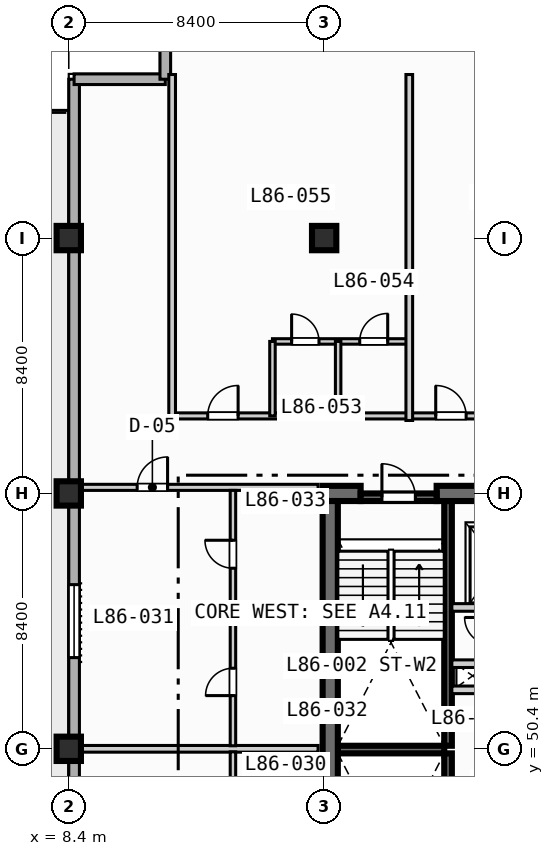
"""IFC4 building model, lengths in metres.
Left out: names, types, materials, properties, quantities, classifications, styles, units other than length and angle.
Written with IfcOpenShell. Run it as: python <this file> out.ifc"""

import sys

from ifc_helpers import new_model, si_unit, direction, frame, frame_2d, origin, origin_2d, place, context, subcontext, project, spatial, rectangle, extrude, element, fill, save


model = new_model("IFC4")
c1 = context("Model", 3, precision=1e-05, world=origin(), true_north=direction((0.0, 1.0)))
c2 = subcontext(c1, "Body", "Model", "MODEL_VIEW")
j1 = project(units=[si_unit("LENGTHUNIT", "METRE"), si_unit("PLANEANGLEUNIT", "RADIAN")], contexts=[c1])
p1 = place(None, origin())
s1 = spatial("IfcSite", under=j1, at=p1, CompositionType="ELEMENT")
p2 = place(p1, origin())
s2 = spatial("IfcBuilding", under=s1, at=p2, CompositionType="ELEMENT")
p3 = place(p2, frame((0.0, 0.0, 347.6)))
s3 = spatial("IfcBuildingStorey", under=s2, at=p3, CompositionType="ELEMENT", Elevation=347.6)
for number, where, z_axis, x_axis in (
    (1, (20.875, 42.2, 0.0), (0.0, 0.0, 1.0), (0.0, 1.0, 0.0)),
    (2, (20.875, 50.5, 0.0), (0.0, 0.0, 1.0), (0.0, 1.0, 0.0)),
):
    element("IfcWall", number, at=place(p3, frame(where, z_axis=z_axis, x_axis=x_axis)), inside=s3, PredefinedType="SOLIDWALL", context=c2, shape_type="SweptSolid", body=[
        extrude(rectangle(XDim=8.05, YDim=0.25, at=frame_2d((4.025, 0.0))), origin(), (0.0, 0.0, 1.0), 3.67),
    ])
p4 = place(p3, frame((17.25, 50.375, 0.0), z_axis=(0.0, 0.0, 1.0), x_axis=(1.0, 0.0, 0.0)))
e3 = element("IfcWall", 3, at=p4, inside=s3, PredefinedType="SOLIDWALL", context=c2, shape_type="SweptSolid", body=[
    extrude(rectangle(XDim=3.5, YDim=0.25, at=frame_2d((1.75, 0.0))), origin(), (0.0, 0.0, 1.0), 3.67),
])
p5 = place(p3, frame((16.75, 58.8, 0.0), z_axis=(0.0, 0.0, 1.0), x_axis=(1.0, 0.0, 0.0)))
e4 = element("IfcWall", 4, at=p5, inside=s3, PredefinedType="SHEAR", context=c2, shape_type="SweptSolid", body=[
    extrude(rectangle(XDim=1.25, YDim=0.5, at=frame_2d((0.625, 0.0))), origin(), (0.0, 0.0, 1.0), 3.67),
])
p6 = place(p3, frame((20.5, 58.8, 0.0), z_axis=(0.0, 0.0, 1.0), x_axis=(1.0, 0.0, 0.0)))
e5 = element("IfcWall", 5, at=p6, inside=s3, PredefinedType="SHEAR", context=c2, shape_type="SweptSolid", body=[
    extrude(rectangle(XDim=4.95, YDim=0.5, at=frame_2d((2.475, 0.0))), origin(), (0.0, 0.0, 1.0), 3.67),
])
p7 = place(p3, frame((17.0, 42.2, 0.0), z_axis=(0.0, 0.0, 1.0), x_axis=(0.0, 1.0, 0.0)))
e6 = element("IfcWall", 6, at=p7, inside=s3, PredefinedType="SHEAR", context=c2, shape_type="SweptSolid", body=[
    extrude(rectangle(XDim=16.35, YDim=0.5, at=frame_2d((8.175, 0.0))), origin(), (0.0, 0.0, 1.0), 3.67),
])
for number, where, z_axis, x_axis in (
    (7, (8.4, 50.4, 0.0), (0.0, 0.0, 1.0), (1.0, 0.0, 0.0)),
    (8, (8.4, 58.8, 0.0), (0.0, 0.0, 1.0), (1.0, 0.0, 0.0)),
    (9, (8.4, 67.2, 0.0), (0.0, 0.0, 1.0), (1.0, 0.0, 0.0)),
    (10, (16.8, 67.2, 0.0), (0.0, 0.0, 1.0), (1.0, 0.0, 0.0)),
):
    element("IfcColumn", number, at=place(p3, frame(where, z_axis=z_axis, x_axis=x_axis)), inside=s3, PredefinedType="COLUMN", context=c2, shape_type="SweptSolid", body=[
        extrude(rectangle(XDim=0.8, YDim=0.8, at=origin_2d()), origin(), (0.0, 0.0, 1.0), 3.9),
    ])
p8 = place(p3, frame((8.575, 11.575, 0.0), z_axis=(0.0, 0.0, 1.0), x_axis=(0.0, 1.0, 0.0)))
e11 = element("IfcWall", 11, at=p8, inside=s3, PredefinedType="STANDARD", context=c2, shape_type="SweptSolid", body=[
    extrude(rectangle(XDim=60.85, YDim=0.35, at=frame_2d((30.425, 0.0))), origin(), (0.0, 0.0, 1.0), 3.67),
])
p9 = place(p8, frame((33.925, 0.0, 0.0)))
e12 = element("IfcOpeningElement", 12, at=p9, cuts=e11, PredefinedType="OPENING", context=c2, shape_type="SweptSolid", body=[
    extrude(rectangle(XDim=1.4, YDim=2.2, at=frame_2d((0.7, 1.1))), frame((0.0, 0.185, 0.0), z_axis=(0.0, -1.0, 0.0), x_axis=(1.0, 0.0, 0.0)), (0.0, 0.0, 1.0), 0.37),
])
p10 = place(p8, frame((16.925, 0.0, 0.85)))
e13 = element("IfcOpeningElement", 13, at=p10, cuts=e11, PredefinedType="OPENING", context=c2, shape_type="SweptSolid", body=[
    extrude(rectangle(XDim=1.8, YDim=1.8, at=frame_2d((0.9, 0.9))), frame((0.0, 0.185, 0.0), z_axis=(0.0, -1.0, 0.0), x_axis=(1.0, 0.0, 0.0)), (0.0, 0.0, 1.0), 0.37),
])
p11 = place(p8, frame((25.025, 0.0, 0.85)))
e14 = element("IfcOpeningElement", 14, at=p11, cuts=e11, PredefinedType="OPENING", context=c2, shape_type="SweptSolid", body=[
    extrude(rectangle(XDim=2.4, YDim=1.95, at=frame_2d((1.2, 0.975))), frame((0.0, 0.185, 0.0), z_axis=(0.0, -1.0, 0.0), x_axis=(1.0, 0.0, 0.0)), (0.0, 0.0, 1.0), 0.37),
])
p12 = place(p8, frame((41.825, 0.0, 0.85)))
e15 = element("IfcOpeningElement", 15, at=p12, cuts=e11, PredefinedType="OPENING", context=c2, shape_type="SweptSolid", body=[
    extrude(rectangle(XDim=2.4, YDim=1.95, at=frame_2d((1.2, 0.975))), frame((0.0, 0.185, 0.0), z_axis=(0.0, -1.0, 0.0), x_axis=(1.0, 0.0, 0.0)), (0.0, 0.0, 1.0), 0.37),
])
for number, where, z_axis, x_axis in (
    (16, (8.575, 72.425, 0.0), (0.0, 0.0, 1.0), (1.0, 0.0, 0.0)),
    (17, (11.575, 72.425, 0.0), (0.0, 0.0, 1.0), (0.0, 1.0, 0.0)),
):
    element("IfcWall", number, at=place(p3, frame(where, z_axis=z_axis, x_axis=x_axis)), inside=s3, PredefinedType="STANDARD", context=c2, shape_type="SweptSolid", body=[
        extrude(rectangle(XDim=3.0, YDim=0.35, at=frame_2d((1.5, 0.0))), origin(), (0.0, 0.0, 1.0), 3.67),
    ])
p13 = place(p3, frame((18.0, 58.675, 0.0), z_axis=(0.0, 0.0, 1.0), x_axis=(1.0, 0.0, 0.0)))
e18 = element("IfcWall", 18, at=p13, inside=s3, PredefinedType="SOLIDWALL", context=c2, shape_type="SweptSolid", body=[
    extrude(rectangle(XDim=2.5, YDim=0.25, at=frame_2d((1.25, 0.0))), origin(), (0.0, 0.0, 1.0), 3.67),
])
p14 = place(p13, frame((0.7, 0.0, 0.0)))
e19 = element("IfcOpeningElement", 19, at=p14, cuts=e18, PredefinedType="OPENING", context=c2, shape_type="SweptSolid", body=[
    extrude(rectangle(XDim=1.1, YDim=2.15, at=frame_2d((0.55, 1.075))), frame((0.0, 0.135, 0.0), z_axis=(0.0, -1.0, 0.0), x_axis=(1.0, 0.0, 0.0)), (0.0, 0.0, 1.0), 0.27),
])
p15 = place(p3, frame((21.0, 52.34, 0.0), z_axis=(0.0, 0.0, 1.0), x_axis=(1.0, 0.0, 0.0)))
e20 = element("IfcWall", 20, at=p15, inside=s3, PredefinedType="SOLIDWALL", context=c2, shape_type="SweptSolid", body=[
    extrude(rectangle(XDim=3.95, YDim=0.25, at=frame_2d((1.975, 0.0))), origin(), (0.0, 0.0, 1.0), 3.67),
])
p16 = place(p3, frame((21.0, 55.05, 0.0), z_axis=(0.0, 0.0, 1.0), x_axis=(1.0, 0.0, 0.0)))
e21 = element("IfcWall", 21, at=p16, inside=s3, PredefinedType="SOLIDWALL", context=c2, shape_type="SweptSolid", body=[
    extrude(rectangle(XDim=4.15, YDim=0.25, at=frame_2d((2.075, 0.0))), origin(), (0.0, 0.0, 1.0), 3.67),
])
p17 = place(p16, frame((1.85, 0.0, 0.0)))
e22 = element("IfcOpeningElement", 22, at=p17, cuts=e21, PredefinedType="OPENING", context=c2, shape_type="SweptSolid", body=[
    extrude(rectangle(XDim=1.1, YDim=2.15, at=frame_2d((0.55, 1.075))), frame((0.0, 0.135, 0.0), z_axis=(0.0, -1.0, 0.0), x_axis=(1.0, 0.0, 0.0)), (0.0, 0.0, 1.0), 0.27),
])
p18 = place(p3, frame((21.0, 53.2, 0.0), z_axis=(0.0, 0.0, 1.0), x_axis=(1.0, 0.0, 0.0)))
e23 = element("IfcWall", 23, at=p18, inside=s3, PredefinedType="SOLIDWALL", context=c2, shape_type="SweptSolid", body=[
    extrude(rectangle(XDim=1.3, YDim=0.25, at=frame_2d((0.65, 0.0))), origin(), (0.0, 0.0, 1.0), 3.67),
])
p19 = place(p3, frame((8.65, 59.0, 0.0), z_axis=(0.0, 0.0, 1.0), x_axis=(1.0, 0.0, 0.0)))
e24 = element("IfcWall", 24, at=p19, inside=s3, PredefinedType="PARTITIONING", context=c2, shape_type="SweptSolid", body=[
    extrude(rectangle(XDim=7.95, YDim=0.2, at=frame_2d((3.975, 0.0))), origin(), (0.0, 0.0, 1.0), 3.07),
])
p20 = place(p19, frame((2.0, 0.0, 0.0)))
e25 = element("IfcOpeningElement", 25, at=p20, cuts=e24, PredefinedType="OPENING", context=c2, shape_type="SweptSolid", body=[
    extrude(rectangle(XDim=1.0, YDim=2.15, at=frame_2d((0.5, 1.075))), frame((0.0, 0.11, 0.0), z_axis=(0.0, -1.0, 0.0), x_axis=(1.0, 0.0, 0.0)), (0.0, 0.0, 1.0), 0.22),
])
p21 = place(p3, frame((8.65, 50.4, 0.0), z_axis=(0.0, 0.0, 1.0), x_axis=(1.0, 0.0, 0.0)))
e26 = element("IfcWall", 26, at=p21, inside=s3, PredefinedType="PARTITIONING", context=c2, shape_type="SweptSolid", body=[
    extrude(rectangle(XDim=7.95, YDim=0.22, at=frame_2d((3.975, 0.0))), origin(), (0.0, 0.0, 1.0), 3.059),
])
p22 = place(p3, frame((13.8, 41.7, 0.0), z_axis=(0.0, 0.0, 1.0), x_axis=(0.0, 1.0, 0.0)))
e27 = element("IfcWall", 27, at=p22, inside=s3, PredefinedType="PLUMBINGWALL", context=c2, shape_type="SweptSolid", body=[
    extrude(rectangle(XDim=8.6, YDim=0.18, at=frame_2d((4.3, 0.0))), origin(), (0.0, 0.0, 1.0), 3.67),
])
p23 = place(p22, frame((1.7, 0.0, 0.0)))
e28 = element("IfcOpeningElement", 28, at=p23, cuts=e27, PredefinedType="OPENING", context=c2, shape_type="SweptSolid", body=[
    extrude(rectangle(XDim=0.9, YDim=2.1, at=frame_2d((0.45, 1.05))), frame((0.0, 0.1, 0.0), z_axis=(0.0, -1.0, 0.0), x_axis=(1.0, 0.0, 0.0)), (0.0, 0.0, 1.0), 0.2),
])
p24 = place(p22, frame((5.99, 0.0, 0.0)))
e29 = element("IfcOpeningElement", 29, at=p24, cuts=e27, PredefinedType="OPENING", context=c2, shape_type="SweptSolid", body=[
    extrude(rectangle(XDim=0.92, YDim=2.1, at=frame_2d((0.46, 1.05))), frame((0.0, 0.1, 0.0), z_axis=(0.0, -1.0, 0.0), x_axis=(1.0, 0.0, 0.0)), (0.0, 0.0, 1.0), 0.2),
])
p25 = place(p3, frame((13.8, 50.5, 0.0), z_axis=(0.0, 0.0, 1.0), x_axis=(0.0, 1.0, 0.0)))
e30 = element("IfcWall", 30, at=p25, inside=s3, PredefinedType="PLUMBINGWALL", context=c2, shape_type="SweptSolid", body=[
    extrude(rectangle(XDim=8.4, YDim=0.18, at=frame_2d((4.2, 0.0))), origin(), (0.0, 0.0, 1.0), 3.67),
])
p26 = place(p25, frame((1.65, 0.0, 0.0)))
e31 = element("IfcOpeningElement", 31, at=p26, cuts=e30, PredefinedType="OPENING", context=c2, shape_type="SweptSolid", body=[
    extrude(rectangle(XDim=0.9, YDim=2.1, at=frame_2d((0.45, 1.05))), frame((0.0, 0.1, 0.0), z_axis=(0.0, -1.0, 0.0), x_axis=(1.0, 0.0, 0.0)), (0.0, 0.0, 1.0), 0.2),
])
p27 = place(p25, frame((5.84, 0.0, 0.0)))
e32 = element("IfcOpeningElement", 32, at=p27, cuts=e30, PredefinedType="OPENING", context=c2, shape_type="SweptSolid", body=[
    extrude(rectangle(XDim=0.92, YDim=2.1, at=frame_2d((0.46, 1.05))), frame((0.0, 0.1, 0.0), z_axis=(0.0, -1.0, 0.0), x_axis=(1.0, 0.0, 0.0)), (0.0, 0.0, 1.0), 0.2),
])
p28 = place(p3, frame((13.8, 54.7, 0.0), z_axis=(0.0, 0.0, 1.0), x_axis=(1.0, 0.0, 0.0)))
e33 = element("IfcWall", 33, at=p28, inside=s3, PredefinedType="PLUMBINGWALL", context=c2, shape_type="SweptSolid", body=[
    extrude(rectangle(XDim=2.8, YDim=0.18, at=frame_2d((1.4, 0.0))), origin(), (0.0, 0.0, 1.0), 3.67),
])
p29 = place(p3, frame((11.8, 61.35, 0.0), z_axis=(0.0, 0.0, 1.0), x_axis=(1.0, 0.0, 0.0)))
e34 = element("IfcWall", 34, at=p29, inside=s3, PredefinedType="PARTITIONING", context=c2, shape_type="SweptSolid", body=[
    extrude(rectangle(XDim=21.35, YDim=0.2, at=frame_2d((10.675, 0.0))), origin(), (0.0, 0.0, 1.0), 3.67),
])
p30 = place(p29, frame((1.17, 0.0, 0.0)))
e35 = element("IfcOpeningElement", 35, at=p30, cuts=e34, PredefinedType="OPENING", context=c2, shape_type="SweptSolid", body=[
    extrude(rectangle(XDim=1.0, YDim=2.15, at=frame_2d((0.5, 1.075))), frame((0.0, 0.11, 0.0), z_axis=(0.0, -1.0, 0.0), x_axis=(1.0, 0.0, 0.0)), (0.0, 0.0, 1.0), 0.22),
])
p31 = place(p29, frame((8.67, 0.0, 0.0)))
e36 = element("IfcOpeningElement", 36, at=p31, cuts=e34, PredefinedType="OPENING", context=c2, shape_type="SweptSolid", body=[
    extrude(rectangle(XDim=1.0, YDim=2.15, at=frame_2d((0.5, 1.075))), frame((0.0, 0.11, 0.0), z_axis=(0.0, -1.0, 0.0), x_axis=(1.0, 0.0, 0.0)), (0.0, 0.0, 1.0), 0.22),
])
p32 = place(p29, frame((15.445, 0.0, 0.0)))
e37 = element("IfcOpeningElement", 37, at=p32, cuts=e34, PredefinedType="OPENING", context=c2, shape_type="SweptSolid", body=[
    extrude(rectangle(XDim=1.0, YDim=2.15, at=frame_2d((0.5, 1.075))), frame((0.0, 0.11, 0.0), z_axis=(0.0, -1.0, 0.0), x_axis=(1.0, 0.0, 0.0)), (0.0, 0.0, 1.0), 0.22),
])
p33 = place(p3, frame((11.8, 61.2, 0.0), z_axis=(0.0, 0.0, 1.0), x_axis=(0.0, 1.0, 0.0)))
e38 = element("IfcWall", 38, at=p33, inside=s3, PredefinedType="PARTITIONING", context=c2, shape_type="SweptSolid", body=[
    extrude(rectangle(XDim=11.38, YDim=0.22, at=frame_2d((5.69, 0.0))), origin(), (0.0, 0.0, 1.0), 3.67),
])
p34 = place(p3, frame((15.1, 63.8, 0.0), z_axis=(0.0, 0.0, 1.0), x_axis=(1.0, 0.0, 0.0)))
e39 = element("IfcWall", 39, at=p34, inside=s3, PredefinedType="PLUMBINGWALL", context=c2, shape_type="SweptSolid", body=[
    extrude(rectangle(XDim=4.5, YDim=0.18, at=frame_2d((2.25, 0.0))), origin(), (0.0, 0.0, 1.0), 3.67),
])
p35 = place(p34, frame((0.63, 0.0, 0.0)))
e40 = element("IfcOpeningElement", 40, at=p35, cuts=e39, PredefinedType="OPENING", context=c2, shape_type="SweptSolid", body=[
    extrude(rectangle(XDim=0.9, YDim=2.1, at=frame_2d((0.45, 1.05))), frame((0.0, 0.1, 0.0), z_axis=(0.0, -1.0, 0.0), x_axis=(1.0, 0.0, 0.0)), (0.0, 0.0, 1.0), 0.2),
])
p36 = place(p34, frame((2.87, 0.0, 0.0)))
e41 = element("IfcOpeningElement", 41, at=p36, cuts=e39, PredefinedType="OPENING", context=c2, shape_type="SweptSolid", body=[
    extrude(rectangle(XDim=0.92, YDim=2.1, at=frame_2d((0.46, 1.05))), frame((0.0, 0.1, 0.0), z_axis=(0.0, -1.0, 0.0), x_axis=(1.0, 0.0, 0.0)), (0.0, 0.0, 1.0), 0.2),
])
for number, where, z_axis, x_axis in (
    (42, (15.1, 61.35, 0.0), (0.0, 0.0, 1.0), (0.0, 1.0, 0.0)),
    (43, (17.26, 61.35, 0.0), (0.0, 0.0, 1.0), (0.0, 1.0, 0.0)),
):
    element("IfcWall", number, at=place(p3, frame(where, z_axis=z_axis, x_axis=x_axis)), inside=s3, PredefinedType="PLUMBINGWALL", context=c2, shape_type="SweptSolid", body=[
        extrude(rectangle(XDim=2.45, YDim=0.18, at=frame_2d((1.225, 0.0))), origin(), (0.0, 0.0, 1.0), 3.67),
    ])
p37 = place(p3, frame((19.6, 61.2, 0.0), z_axis=(0.0, 0.0, 1.0), x_axis=(0.0, 1.0, 0.0)))
e44 = element("IfcWall", 44, at=p37, inside=s3, PredefinedType="PARTITIONING", context=c2, shape_type="SweptSolid", body=[
    extrude(rectangle(XDim=11.38, YDim=0.22, at=frame_2d((5.69, 0.0))), origin(), (0.0, 0.0, 1.0), 3.67),
])
p38 = place(p12, origin())
e45 = element("IfcWindow", 45, at=p38, inside=s3, PartitioningType="SINGLE_PANEL", PredefinedType="WINDOW", context=c2, shape_type="SweptSolid", body=[
    extrude(rectangle(XDim=2.4, YDim=1.95, at=frame_2d((1.2, 0.975))), frame((0.0, 0.03, 0.0), z_axis=(0.0, -1.0, 0.0), x_axis=(1.0, 0.0, 0.0)), (0.0, 0.0, 1.0), 0.06),
])
fill(e15, e45)
p39 = place(p14, origin())
e46 = element("IfcDoor", 46, at=p39, inside=s3, OperationType="SINGLE_SWING_LEFT", PredefinedType="DOOR", context=c2, shape_type="SweptSolid", body=[
    extrude(rectangle(XDim=1.1, YDim=2.15, at=frame_2d((0.55, 1.075))), frame((0.0, 0.025, 0.0), z_axis=(0.0, -1.0, 0.0), x_axis=(1.0, 0.0, 0.0)), (0.0, 0.0, 1.0), 0.05),
])
fill(e19, e46)
p40 = place(p20, origin())
e47 = element("IfcDoor", 47, at=p40, inside=s3, OperationType="SINGLE_SWING_RIGHT", PredefinedType="DOOR", context=c2, shape_type="SweptSolid", body=[
    extrude(rectangle(XDim=1.0, YDim=2.15, at=frame_2d((0.5, 1.075))), frame((0.0, 0.025, 0.0), z_axis=(0.0, -1.0, 0.0), x_axis=(1.0, 0.0, 0.0)), (0.0, 0.0, 1.0), 0.05),
])
fill(e25, e47)
p41 = place(p26, origin())
e48 = element("IfcDoor", 48, at=p41, inside=s3, OperationType="SINGLE_SWING_LEFT", PredefinedType="DOOR", context=c2, shape_type="SweptSolid", body=[
    extrude(rectangle(XDim=0.9, YDim=2.1, at=frame_2d((0.45, 1.05))), frame((0.0, 0.025, 0.0), z_axis=(0.0, -1.0, 0.0), x_axis=(1.0, 0.0, 0.0)), (0.0, 0.0, 1.0), 0.05),
])
fill(e31, e48)
p42 = place(p27, origin())
e49 = element("IfcDoor", 49, at=p42, inside=s3, OperationType="SINGLE_SWING_RIGHT", PredefinedType="DOOR", context=c2, shape_type="SweptSolid", body=[
    extrude(rectangle(XDim=0.92, YDim=2.1, at=frame_2d((0.46, 1.05))), frame((0.0, 0.025, 0.0), z_axis=(0.0, -1.0, 0.0), x_axis=(1.0, 0.0, 0.0)), (0.0, 0.0, 1.0), 0.05),
])
fill(e32, e49)
p43 = place(p30, origin())
e50 = element("IfcDoor", 50, at=p43, inside=s3, OperationType="SINGLE_SWING_RIGHT", PredefinedType="DOOR", context=c2, shape_type="SweptSolid", body=[
    extrude(rectangle(XDim=1.0, YDim=2.15, at=frame_2d((0.5, 1.075))), frame((0.0, 0.025, 0.0), z_axis=(0.0, -1.0, 0.0), x_axis=(1.0, 0.0, 0.0)), (0.0, 0.0, 1.0), 0.05),
])
fill(e35, e50)
p44 = place(p31, origin())
e51 = element("IfcDoor", 51, at=p44, inside=s3, OperationType="SINGLE_SWING_LEFT", PredefinedType="DOOR", context=c2, shape_type="SweptSolid", body=[
    extrude(rectangle(XDim=1.0, YDim=2.15, at=frame_2d((0.5, 1.075))), frame((0.0, 0.025, 0.0), z_axis=(0.0, -1.0, 0.0), x_axis=(1.0, 0.0, 0.0)), (0.0, 0.0, 1.0), 0.05),
])
fill(e36, e51)
p45 = place(p35, origin())
e52 = element("IfcDoor", 52, at=p45, inside=s3, OperationType="SINGLE_SWING_LEFT", PredefinedType="DOOR", context=c2, shape_type="SweptSolid", body=[
    extrude(rectangle(XDim=0.9, YDim=2.1, at=frame_2d((0.45, 1.05))), frame((0.0, 0.025, 0.0), z_axis=(0.0, -1.0, 0.0), x_axis=(1.0, 0.0, 0.0)), (0.0, 0.0, 1.0), 0.05),
])
fill(e40, e52)
p46 = place(p36, origin())
e53 = element("IfcDoor", 53, at=p46, inside=s3, OperationType="SINGLE_SWING_RIGHT", PredefinedType="DOOR", context=c2, shape_type="SweptSolid", body=[
    extrude(rectangle(XDim=0.92, YDim=2.1, at=frame_2d((0.46, 1.05))), frame((0.0, 0.025, 0.0), z_axis=(0.0, -1.0, 0.0), x_axis=(1.0, 0.0, 0.0)), (0.0, 0.0, 1.0), 0.05),
])
fill(e41, e53)
save(model, sys.argv[1])
